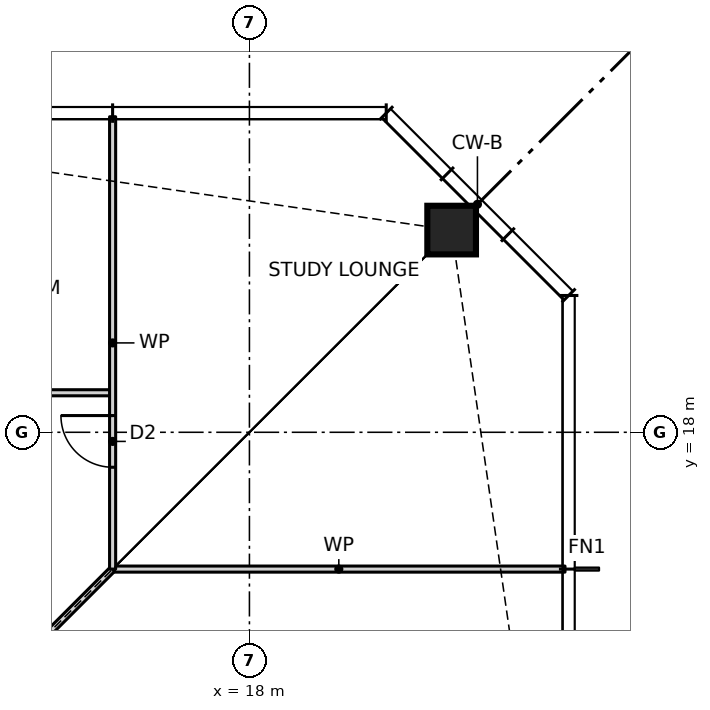
"""IFC4 building model, lengths in metres.
Left out: names, types, materials, properties, quantities, classifications, styles, units other than length and angle.
Written with IfcOpenShell. Run it as: python <this file> out.ifc"""

import sys

from ifc_helpers import new_model, si_unit, direction, frame, frame_2d, origin, origin_2d, place, context, subcontext, project, spatial, rectangle, hollow_rectangle, extrude, element, fill, save


model = new_model("IFC4")
c1 = context("Model", 3, precision=1e-05, world=origin(), true_north=direction((0.0, 1.0)))
c2 = subcontext(c1, "Body", "Model", "MODEL_VIEW")
j1 = project(units=[si_unit("LENGTHUNIT", "METRE"), si_unit("PLANEANGLEUNIT", "RADIAN")], contexts=[c1])
p1 = place(None, origin())
s1 = spatial("IfcSite", under=j1, at=p1, CompositionType="ELEMENT")
p2 = place(p1, origin())
s2 = spatial("IfcBuilding", under=s1, at=p2, CompositionType="ELEMENT")
p3 = place(p2, frame((0.0, 0.0, 67.5)))
s3 = spatial("IfcBuildingStorey", under=s2, at=p3, CompositionType="ELEMENT", Elevation=67.5)
p4 = place(p3, frame((21.326, 21.326, 0.0), z_axis=(0.0, 0.0, 1.0), x_axis=(1.0, 0.0, 0.0)))
e1 = element("IfcColumn", 1, at=p4, inside=s3, PredefinedType="COLUMN", context=c2, shape_type="SweptSolid", body=[
    extrude(hollow_rectangle(XDim=0.8, YDim=0.8, WallThickness=0.09, at=origin_2d()), origin(), (0.0, 0.0, 1.0), 3.5),
])
p5 = place(p3, frame((15.75, 15.75, 0.0), z_axis=(0.0, 0.0, 1.0), x_axis=(1.0, 0.0, 0.0)))
e2 = element("IfcWall", 2, at=p5, inside=s3, PredefinedType="PARTITIONING", context=c2, shape_type="SweptSolid", body=[
    extrude(rectangle(XDim=7.44, YDim=0.1, at=frame_2d((3.72, 0.0))), origin(), (0.0, 0.0, 1.0), 3.27),
])
p6 = place(p3, frame((-11.25, 18.65, 0.0), z_axis=(0.0, 0.0, 1.0), x_axis=(1.0, 0.0, 0.0)))
e3 = element("IfcWall", 3, at=p6, inside=s3, PredefinedType="PARTITIONING", context=c2, shape_type="SweptSolid", body=[
    extrude(rectangle(XDim=27.0, YDim=0.1, at=frame_2d((13.5, 0.0))), origin(), (0.0, 0.0, 1.0), 3.27),
])
p7 = place(p6, frame((24.3, 0.0, 0.0)))
e4 = element("IfcOpeningElement", 4, at=p7, cuts=e3, PredefinedType="OPENING", context=c2, shape_type="SweptSolid", body=[
    extrude(rectangle(XDim=0.9, YDim=2.1, at=frame_2d((0.45, 1.05))), frame((0.0, 0.06, 0.0), z_axis=(0.0, -1.0, 0.0), x_axis=(1.0, 0.0, 0.0)), (0.0, 0.0, 1.0), 0.12),
])
p8 = place(p6, frame((19.8, 0.0, 0.0)))
e5 = element("IfcOpeningElement", 5, at=p8, cuts=e3, PredefinedType="OPENING", context=c2, shape_type="SweptSolid", body=[
    extrude(rectangle(XDim=0.9, YDim=2.1, at=frame_2d((0.45, 1.05))), frame((0.0, 0.06, 0.0), z_axis=(0.0, -1.0, 0.0), x_axis=(1.0, 0.0, 0.0)), (0.0, 0.0, 1.0), 0.12),
])
p9 = place(p6, frame((15.3, 0.0, 0.0)))
e6 = element("IfcOpeningElement", 6, at=p9, cuts=e3, PredefinedType="OPENING", context=c2, shape_type="SweptSolid", body=[
    extrude(rectangle(XDim=0.9, YDim=2.1, at=frame_2d((0.45, 1.05))), frame((0.0, 0.06, 0.0), z_axis=(0.0, -1.0, 0.0), x_axis=(1.0, 0.0, 0.0)), (0.0, 0.0, 1.0), 0.12),
])
p10 = place(p6, frame((10.8, 0.0, 0.0)))
e7 = element("IfcOpeningElement", 7, at=p10, cuts=e3, PredefinedType="OPENING", context=c2, shape_type="SweptSolid", body=[
    extrude(rectangle(XDim=0.9, YDim=2.1, at=frame_2d((0.45, 1.05))), frame((0.0, 0.06, 0.0), z_axis=(0.0, -1.0, 0.0), x_axis=(1.0, 0.0, 0.0)), (0.0, 0.0, 1.0), 0.12),
])
p11 = place(p6, frame((6.3, 0.0, 0.0)))
e8 = element("IfcOpeningElement", 8, at=p11, cuts=e3, PredefinedType="OPENING", context=c2, shape_type="SweptSolid", body=[
    extrude(rectangle(XDim=0.9, YDim=2.1, at=frame_2d((0.45, 1.05))), frame((0.0, 0.06, 0.0), z_axis=(0.0, -1.0, 0.0), x_axis=(1.0, 0.0, 0.0)), (0.0, 0.0, 1.0), 0.12),
])
p12 = place(p6, frame((1.8, 0.0, 0.0)))
e9 = element("IfcOpeningElement", 9, at=p12, cuts=e3, PredefinedType="OPENING", context=c2, shape_type="SweptSolid", body=[
    extrude(rectangle(XDim=0.9, YDim=2.1, at=frame_2d((0.45, 1.05))), frame((0.0, 0.06, 0.0), z_axis=(0.0, -1.0, 0.0), x_axis=(1.0, 0.0, 0.0)), (0.0, 0.0, 1.0), 0.12),
])
p13 = place(p3, frame((11.6, 11.6, 0.0), z_axis=(0.0, 0.0, 1.0), x_axis=(0.707106781187, 0.707106781187, 0.0)))
e10 = element("IfcWall", 10, at=p13, inside=s3, PredefinedType="PARTITIONING", context=c2, shape_type="SweptSolid", body=[
    extrude(rectangle(XDim=5.869, YDim=0.1, at=frame_2d((2.935, 0.0))), origin(), (0.0, 0.0, 1.0), 2.343),
])
p14 = place(p3, frame((15.75, 15.75, 0.0), z_axis=(0.0, 0.0, 1.0), x_axis=(0.0, 1.0, 0.0)))
e11 = element("IfcWall", 11, at=p14, inside=s3, PredefinedType="PARTITIONING", context=c2, shape_type="SweptSolid", body=[
    extrude(rectangle(XDim=7.44, YDim=0.1, at=frame_2d((3.72, 0.0))), origin(), (0.0, 0.0, 1.0), 3.27),
])
p15 = place(p14, frame((1.675, 0.0, 0.0)))
e12 = element("IfcOpeningElement", 12, at=p15, cuts=e11, PredefinedType="OPENING", context=c2, shape_type="SweptSolid", body=[
    extrude(rectangle(XDim=0.85, YDim=2.1, at=frame_2d((0.425, 1.05))), frame((0.0, 0.06, 0.0), z_axis=(0.0, -1.0, 0.0), x_axis=(1.0, 0.0, 0.0)), (0.0, 0.0, 1.0), 0.12),
])
p16 = place(p15, origin())
e13 = element("IfcDoor", 13, at=p16, inside=s3, OperationType="SINGLE_SWING_RIGHT", PredefinedType="DOOR", context=c2, shape_type="SweptSolid", body=[
    extrude(rectangle(XDim=0.85, YDim=2.1, at=frame_2d((0.425, 1.05))), frame((0.0, 0.025, 0.0), z_axis=(0.0, -1.0, 0.0), x_axis=(1.0, 0.0, 0.0)), (0.0, 0.0, 1.0), 0.05),
])
fill(e12, e13)
save(model, sys.argv[1])
